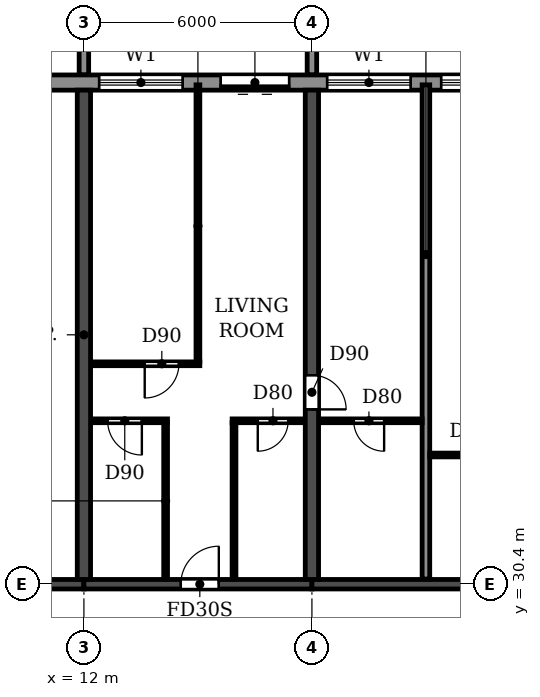
"""IFC4 building model, lengths in metres.
Left out: names, types, materials, properties, quantities, classifications, styles, units other than length and angle.
Written with IfcOpenShell. Run it as: python <this file> out.ifc"""

import sys

from ifc_helpers import new_model, si_unit, direction, frame, frame_2d, origin, place, context, subcontext, project, spatial, polyline, rectangle, outline, extrude, source, transform, mapped, element, fill, save


model = new_model("IFC4")
c1 = context("Model", 3, precision=1e-05, world=origin(), true_north=direction((0.0, 1.0)))
c2 = subcontext(c1, "Body", "Model", "MODEL_VIEW")
j1 = project(units=[si_unit("LENGTHUNIT", "METRE"), si_unit("PLANEANGLEUNIT", "RADIAN")], contexts=[c1])
p1 = place(None, origin())
s1 = spatial("IfcSite", under=j1, at=p1, CompositionType="ELEMENT")
p2 = place(p1, origin())
s2 = spatial("IfcBuilding", under=s1, at=p2, CompositionType="ELEMENT")
p3 = place(p2, frame((0.0, 0.0, 92.7)))
s3 = spatial("IfcBuildingStorey", under=s2, at=p3, CompositionType="ELEMENT", Elevation=92.7)
p4 = place(p3, frame((12.0, 30.525, 0.0), z_axis=(0.0, 0.0, 1.0), x_axis=(0.0, 1.0, 0.0)))
e1 = element("IfcWall", 1, at=p4, inside=s3, PredefinedType="SHEAR", context=c2, shape_type="SweptSolid", body=[
    extrude(rectangle(XDim=12.875, YDim=0.35, at=frame_2d((6.438, 0.0))), origin(), (0.0, 0.0, 1.0), 3.06),
])
p5 = place(p3, frame((18.0, 30.525, 0.0), z_axis=(0.0, 0.0, 1.0), x_axis=(0.0, 1.0, 0.0)))
e2 = element("IfcWall", 2, at=p5, inside=s3, PredefinedType="SHEAR", context=c2, shape_type="SweptSolid", body=[
    extrude(rectangle(XDim=12.875, YDim=0.35, at=frame_2d((6.438, 0.0))), origin(), (0.0, 0.0, 1.0), 3.06),
])
p6 = place(p5, frame((4.475, 0.0, 0.0)))
e3 = element("IfcOpeningElement", 3, at=p6, cuts=e2, PredefinedType="OPENING", context=c2, shape_type="SweptSolid", body=[
    extrude(rectangle(XDim=0.9, YDim=2.1, at=frame_2d((0.45, 1.05))), frame((0.0, 0.185, 0.0), z_axis=(0.0, -1.0, 0.0), x_axis=(1.0, 0.0, 0.0)), (0.0, 0.0, 1.0), 0.37),
])
p7 = place(p3, frame((6.2, 30.4, 0.0), z_axis=(0.0, 0.0, 1.0), x_axis=(1.0, 0.0, 0.0)))
e4 = element("IfcWall", 4, at=p7, inside=s3, PredefinedType="SHEAR", context=c2, shape_type="SweptSolid", body=[
    extrude(rectangle(XDim=5.8, YDim=0.25, at=frame_2d((2.9, 0.0))), origin(), (0.0, 0.0, 1.0), 2.46),
])
p8 = place(p7, frame((2.3, 0.0, 0.0)))
e5 = element("IfcOpeningElement", 5, at=p8, cuts=e4, PredefinedType="OPENING", context=c2, shape_type="SweptSolid", body=[
    extrude(rectangle(XDim=1.0, YDim=2.1, at=frame_2d((0.5, 1.05))), frame((0.0, 0.135, 0.0), z_axis=(0.0, -1.0, 0.0), x_axis=(1.0, 0.0, 0.0)), (0.0, 0.0, 1.0), 0.27),
])
p9 = place(p3, frame((12.0, 30.4, 0.0), z_axis=(0.0, 0.0, 1.0), x_axis=(1.0, 0.0, 0.0)))
e6 = element("IfcWall", 6, at=p9, inside=s3, PredefinedType="SHEAR", context=c2, shape_type="SweptSolid", body=[
    extrude(rectangle(XDim=6.0, YDim=0.25, at=frame_2d((3.0, 0.0))), origin(), (0.0, 0.0, 1.0), 2.46),
])
p10 = place(p9, frame((2.55, 0.0, 0.0)))
e7 = element("IfcOpeningElement", 7, at=p10, cuts=e6, PredefinedType="OPENING", context=c2, shape_type="SweptSolid", body=[
    extrude(rectangle(XDim=1.0, YDim=2.1, at=frame_2d((0.5, 1.05))), frame((0.0, 0.135, 0.0), z_axis=(0.0, -1.0, 0.0), x_axis=(1.0, 0.0, 0.0)), (0.0, 0.0, 1.0), 0.27),
])
p11 = place(p3, frame((18.0, 30.4, 0.0), z_axis=(0.0, 0.0, 1.0), x_axis=(1.0, 0.0, 0.0)))
e8 = element("IfcWall", 8, at=p11, inside=s3, PredefinedType="SHEAR", context=c2, shape_type="SweptSolid", body=[
    extrude(rectangle(XDim=6.0, YDim=0.25, at=frame_2d((3.0, 0.0))), origin(), (0.0, 0.0, 1.0), 2.46),
])
p12 = place(p3, frame((91.317, 43.6, 0.0), z_axis=(0.0, 0.0, 1.0), x_axis=(-1.0, 0.0, 0.0)))
e9 = element("IfcWall", 9, at=p12, inside=s3, PredefinedType="STANDARD", context=c2, shape_type="SweptSolid", body=[
    extrude(rectangle(XDim=80.634, YDim=0.4, at=frame_2d((40.317, 0.0))), origin(), (0.0, 0.0, 1.0), 3.06),
])
p13 = place(p12, frame((76.717, 0.0, 0.9)))
e10 = element("IfcOpeningElement", 10, at=p13, cuts=e9, PredefinedType="OPENING", context=c2, shape_type="SweptSolid", body=[
    extrude(rectangle(XDim=2.2, YDim=1.5, at=frame_2d((1.1, 0.75))), frame((0.0, 0.21, 0.0), z_axis=(0.0, -1.0, 0.0), x_axis=(1.0, 0.0, 0.0)), (0.0, 0.0, 1.0), 0.42),
])
p14 = place(p12, frame((73.917, 0.0, 0.0)))
e11 = element("IfcOpeningElement", 11, at=p14, cuts=e9, PredefinedType="OPENING", context=c2, shape_type="SweptSolid", body=[
    extrude(rectangle(XDim=1.8, YDim=2.4, at=frame_2d((0.9, 1.2))), frame((0.0, 0.21, 0.0), z_axis=(0.0, -1.0, 0.0), x_axis=(1.0, 0.0, 0.0)), (0.0, 0.0, 1.0), 0.42),
])
p15 = place(p12, frame((70.717, 0.0, 0.9)))
e12 = element("IfcOpeningElement", 12, at=p15, cuts=e9, PredefinedType="OPENING", context=c2, shape_type="SweptSolid", body=[
    extrude(rectangle(XDim=2.2, YDim=1.5, at=frame_2d((1.1, 0.75))), frame((0.0, 0.21, 0.0), z_axis=(0.0, -1.0, 0.0), x_axis=(1.0, 0.0, 0.0)), (0.0, 0.0, 1.0), 0.42),
])
p16 = place(p12, frame((67.717, 0.0, 0.9)))
e13 = element("IfcOpeningElement", 13, at=p16, cuts=e9, PredefinedType="OPENING", context=c2, shape_type="SweptSolid", body=[
    extrude(rectangle(XDim=2.2, YDim=1.5, at=frame_2d((1.1, 0.75))), frame((0.0, 0.21, 0.0), z_axis=(0.0, -1.0, 0.0), x_axis=(1.0, 0.0, 0.0)), (0.0, 0.0, 1.0), 0.42),
])
p17 = place(p12, frame((64.717, 0.0, 0.9)))
e14 = element("IfcOpeningElement", 14, at=p17, cuts=e9, PredefinedType="OPENING", context=c2, shape_type="SweptSolid", body=[
    extrude(rectangle(XDim=2.2, YDim=1.5, at=frame_2d((1.1, 0.75))), frame((0.0, 0.21, 0.0), z_axis=(0.0, -1.0, 0.0), x_axis=(1.0, 0.0, 0.0)), (0.0, 0.0, 1.0), 0.42),
])
p18 = place(p12, frame((61.917, 0.0, 0.0)))
e15 = element("IfcOpeningElement", 15, at=p18, cuts=e9, PredefinedType="OPENING", context=c2, shape_type="SweptSolid", body=[
    extrude(rectangle(XDim=1.8, YDim=2.4, at=frame_2d((0.9, 1.2))), frame((0.0, 0.21, 0.0), z_axis=(0.0, -1.0, 0.0), x_axis=(1.0, 0.0, 0.0)), (0.0, 0.0, 1.0), 0.42),
])
p19 = place(p12, frame((58.717, 0.0, 0.9)))
e16 = element("IfcOpeningElement", 16, at=p19, cuts=e9, PredefinedType="OPENING", context=c2, shape_type="SweptSolid", body=[
    extrude(rectangle(XDim=2.2, YDim=1.5, at=frame_2d((1.1, 0.75))), frame((0.0, 0.21, 0.0), z_axis=(0.0, -1.0, 0.0), x_axis=(1.0, 0.0, 0.0)), (0.0, 0.0, 1.0), 0.42),
])
p20 = place(p12, frame((55.717, 0.0, 0.9)))
e17 = element("IfcOpeningElement", 17, at=p20, cuts=e9, PredefinedType="OPENING", context=c2, shape_type="SweptSolid", body=[
    extrude(rectangle(XDim=2.2, YDim=1.5, at=frame_2d((1.1, 0.75))), frame((0.0, 0.21, 0.0), z_axis=(0.0, -1.0, 0.0), x_axis=(1.0, 0.0, 0.0)), (0.0, 0.0, 1.0), 0.42),
])
p21 = place(p12, frame((52.917, 0.0, 0.0)))
e18 = element("IfcOpeningElement", 18, at=p21, cuts=e9, PredefinedType="OPENING", context=c2, shape_type="SweptSolid", body=[
    extrude(rectangle(XDim=1.8, YDim=2.4, at=frame_2d((0.9, 1.2))), frame((0.0, 0.21, 0.0), z_axis=(0.0, -1.0, 0.0), x_axis=(1.0, 0.0, 0.0)), (0.0, 0.0, 1.0), 0.42),
])
p22 = place(p12, frame((49.717, 0.0, 0.9)))
e19 = element("IfcOpeningElement", 19, at=p22, cuts=e9, PredefinedType="OPENING", context=c2, shape_type="SweptSolid", body=[
    extrude(rectangle(XDim=2.2, YDim=1.5, at=frame_2d((1.1, 0.75))), frame((0.0, 0.21, 0.0), z_axis=(0.0, -1.0, 0.0), x_axis=(1.0, 0.0, 0.0)), (0.0, 0.0, 1.0), 0.42),
])
p23 = place(p12, frame((46.717, 0.0, 0.9)))
e20 = element("IfcOpeningElement", 20, at=p23, cuts=e9, PredefinedType="OPENING", context=c2, shape_type="SweptSolid", body=[
    extrude(rectangle(XDim=2.2, YDim=1.5, at=frame_2d((1.1, 0.75))), frame((0.0, 0.21, 0.0), z_axis=(0.0, -1.0, 0.0), x_axis=(1.0, 0.0, 0.0)), (0.0, 0.0, 1.0), 0.42),
])
p24 = place(p12, frame((43.717, 0.0, 0.9)))
e21 = element("IfcOpeningElement", 21, at=p24, cuts=e9, PredefinedType="OPENING", context=c2, shape_type="SweptSolid", body=[
    extrude(rectangle(XDim=2.2, YDim=1.5, at=frame_2d((1.1, 0.75))), frame((0.0, 0.21, 0.0), z_axis=(0.0, -1.0, 0.0), x_axis=(1.0, 0.0, 0.0)), (0.0, 0.0, 1.0), 0.42),
])
p25 = place(p12, frame((40.717, 0.0, 0.9)))
e22 = element("IfcOpeningElement", 22, at=p25, cuts=e9, PredefinedType="OPENING", context=c2, shape_type="SweptSolid", body=[
    extrude(rectangle(XDim=2.2, YDim=1.5, at=frame_2d((1.1, 0.75))), frame((0.0, 0.21, 0.0), z_axis=(0.0, -1.0, 0.0), x_axis=(1.0, 0.0, 0.0)), (0.0, 0.0, 1.0), 0.42),
])
p26 = place(p12, frame((37.917, 0.0, 0.0)))
e23 = element("IfcOpeningElement", 23, at=p26, cuts=e9, PredefinedType="OPENING", context=c2, shape_type="SweptSolid", body=[
    extrude(rectangle(XDim=1.8, YDim=2.4, at=frame_2d((0.9, 1.2))), frame((0.0, 0.21, 0.0), z_axis=(0.0, -1.0, 0.0), x_axis=(1.0, 0.0, 0.0)), (0.0, 0.0, 1.0), 0.42),
])
p27 = place(p12, frame((34.917, 0.0, 0.0)))
e24 = element("IfcOpeningElement", 24, at=p27, cuts=e9, PredefinedType="OPENING", context=c2, shape_type="SweptSolid", body=[
    extrude(rectangle(XDim=1.8, YDim=2.4, at=frame_2d((0.9, 1.2))), frame((0.0, 0.21, 0.0), z_axis=(0.0, -1.0, 0.0), x_axis=(1.0, 0.0, 0.0)), (0.0, 0.0, 1.0), 0.42),
])
p28 = place(p12, frame((31.717, 0.0, 0.9)))
e25 = element("IfcOpeningElement", 25, at=p28, cuts=e9, PredefinedType="OPENING", context=c2, shape_type="SweptSolid", body=[
    extrude(rectangle(XDim=2.2, YDim=1.5, at=frame_2d((1.1, 0.75))), frame((0.0, 0.21, 0.0), z_axis=(0.0, -1.0, 0.0), x_axis=(1.0, 0.0, 0.0)), (0.0, 0.0, 1.0), 0.42),
])
p29 = place(p12, frame((28.717, 0.0, 0.9)))
e26 = element("IfcOpeningElement", 26, at=p29, cuts=e9, PredefinedType="OPENING", context=c2, shape_type="SweptSolid", body=[
    extrude(rectangle(XDim=2.2, YDim=1.5, at=frame_2d((1.1, 0.75))), frame((0.0, 0.21, 0.0), z_axis=(0.0, -1.0, 0.0), x_axis=(1.0, 0.0, 0.0)), (0.0, 0.0, 1.0), 0.42),
])
p30 = place(p12, frame((25.717, 0.0, 0.9)))
e27 = element("IfcOpeningElement", 27, at=p30, cuts=e9, PredefinedType="OPENING", context=c2, shape_type="SweptSolid", body=[
    extrude(rectangle(XDim=2.2, YDim=1.5, at=frame_2d((1.1, 0.75))), frame((0.0, 0.21, 0.0), z_axis=(0.0, -1.0, 0.0), x_axis=(1.0, 0.0, 0.0)), (0.0, 0.0, 1.0), 0.42),
])
p31 = place(p12, frame((22.717, 0.0, 0.9)))
e28 = element("IfcOpeningElement", 28, at=p31, cuts=e9, PredefinedType="OPENING", context=c2, shape_type="SweptSolid", body=[
    extrude(rectangle(XDim=2.2, YDim=1.5, at=frame_2d((1.1, 0.75))), frame((0.0, 0.21, 0.0), z_axis=(0.0, -1.0, 0.0), x_axis=(1.0, 0.0, 0.0)), (0.0, 0.0, 1.0), 0.42),
])
p32 = place(p12, frame((19.917, 0.0, 0.0)))
e29 = element("IfcOpeningElement", 29, at=p32, cuts=e9, PredefinedType="OPENING", context=c2, shape_type="SweptSolid", body=[
    extrude(rectangle(XDim=1.8, YDim=2.4, at=frame_2d((0.9, 1.2))), frame((0.0, 0.21, 0.0), z_axis=(0.0, -1.0, 0.0), x_axis=(1.0, 0.0, 0.0)), (0.0, 0.0, 1.0), 0.42),
])
p33 = place(p12, frame((16.717, 0.0, 0.9)))
e30 = element("IfcOpeningElement", 30, at=p33, cuts=e9, PredefinedType="OPENING", context=c2, shape_type="SweptSolid", body=[
    extrude(rectangle(XDim=2.2, YDim=1.5, at=frame_2d((1.1, 0.75))), frame((0.0, 0.21, 0.0), z_axis=(0.0, -1.0, 0.0), x_axis=(1.0, 0.0, 0.0)), (0.0, 0.0, 1.0), 0.42),
])
p34 = place(p12, frame((13.917, 0.0, 0.0)))
e31 = element("IfcOpeningElement", 31, at=p34, cuts=e9, PredefinedType="OPENING", context=c2, shape_type="SweptSolid", body=[
    extrude(rectangle(XDim=1.8, YDim=2.4, at=frame_2d((0.9, 1.2))), frame((0.0, 0.21, 0.0), z_axis=(0.0, -1.0, 0.0), x_axis=(1.0, 0.0, 0.0)), (0.0, 0.0, 1.0), 0.42),
])
p35 = place(p12, frame((10.717, 0.0, 0.9)))
e32 = element("IfcOpeningElement", 32, at=p35, cuts=e9, PredefinedType="OPENING", context=c2, shape_type="SweptSolid", body=[
    extrude(rectangle(XDim=2.2, YDim=1.5, at=frame_2d((1.1, 0.75))), frame((0.0, 0.21, 0.0), z_axis=(0.0, -1.0, 0.0), x_axis=(1.0, 0.0, 0.0)), (0.0, 0.0, 1.0), 0.42),
])
p36 = place(p12, frame((7.917, 0.0, 0.0)))
e33 = element("IfcOpeningElement", 33, at=p36, cuts=e9, PredefinedType="OPENING", context=c2, shape_type="SweptSolid", body=[
    extrude(rectangle(XDim=1.8, YDim=2.4, at=frame_2d((0.9, 1.2))), frame((0.0, 0.21, 0.0), z_axis=(0.0, -1.0, 0.0), x_axis=(1.0, 0.0, 0.0)), (0.0, 0.0, 1.0), 0.42),
])
p37 = place(p12, frame((4.717, 0.0, 0.9)))
e34 = element("IfcOpeningElement", 34, at=p37, cuts=e9, PredefinedType="OPENING", context=c2, shape_type="SweptSolid", body=[
    extrude(rectangle(XDim=2.2, YDim=1.5, at=frame_2d((1.1, 0.75))), frame((0.0, 0.21, 0.0), z_axis=(0.0, -1.0, 0.0), x_axis=(1.0, 0.0, 0.0)), (0.0, 0.0, 1.0), 0.42),
])
p38 = place(p12, frame((1.917, 0.0, 0.0)))
e35 = element("IfcOpeningElement", 35, at=p38, cuts=e9, PredefinedType="OPENING", context=c2, shape_type="SweptSolid", body=[
    extrude(rectangle(XDim=1.8, YDim=2.4, at=frame_2d((0.9, 1.2))), frame((0.0, 0.21, 0.0), z_axis=(0.0, -1.0, 0.0), x_axis=(1.0, 0.0, 0.0)), (0.0, 0.0, 1.0), 0.42),
])
m1 = source(origin(), c2, "Body", "SweptSolid", [
    extrude(outline(polyline([(0.0, 0.0), (0.25, 0.0), (0.25, 3.1), (0.0, 3.1), (0.0, 0.0)])), origin(), (0.0, 0.0, 1.0), 3.1),
])
for number, where in (
    (36, (11.875, 43.8, 0.0)),
    (37, (17.875, 43.8, 0.0)),
):
    element("IfcWall", number, at=place(p3, frame(where)), inside=s3, PredefinedType="STANDARD", context=c2, shape_type="MappedRepresentation", body=[
        mapped(m1, transform((0.0, 0.0, 0.0))),
    ])
p39 = place(p3, frame((21.0, 30.535, 0.0), z_axis=(0.0, 0.0, 1.0), x_axis=(0.0, 1.0, 0.0)))
e38 = element("IfcWall", 38, at=p39, inside=s3, PredefinedType="PARTITIONING", context=c2, shape_type="SweptSolid", body=[
    extrude(rectangle(XDim=13.005, YDim=0.2, at=frame_2d((6.502, 0.0))), origin(), (0.0, 0.0, 1.0), 3.06),
])
p40 = place(p3, frame((21.1, 33.8, 0.0), z_axis=(0.0, 0.0, 1.0), x_axis=(1.0, 0.0, 0.0)))
e39 = element("IfcWall", 39, at=p40, inside=s3, PredefinedType="PARTITIONING", context=c2, shape_type="SweptSolid", body=[
    extrude(rectangle(XDim=2.715, YDim=0.1, at=frame_2d((1.357, 0.0))), origin(), (0.0, 0.0, 1.0), 3.06),
])
p41 = place(p40, frame((1.0, 0.0, 0.0)))
e40 = element("IfcOpeningElement", 40, at=p41, cuts=e39, PredefinedType="OPENING", context=c2, shape_type="SweptSolid", body=[
    extrude(rectangle(XDim=0.8, YDim=2.1, at=frame_2d((0.4, 1.05))), frame((0.0, 0.06, 0.0), z_axis=(0.0, -1.0, 0.0), x_axis=(1.0, 0.0, 0.0)), (0.0, 0.0, 1.0), 0.12),
])
p42 = place(p3, frame((12.185, 34.7, 0.0), z_axis=(0.0, 0.0, 1.0), x_axis=(1.0, 0.0, 0.0)))
e41 = element("IfcWall", 41, at=p42, inside=s3, PredefinedType="PARTITIONING", context=c2, shape_type="SweptSolid", body=[
    extrude(rectangle(XDim=2.015, YDim=0.1, at=frame_2d((1.007, 0.0))), origin(), (0.0, 0.0, 1.0), 3.06),
])
p43 = place(p42, frame((0.44, 0.0, 0.0)))
e42 = element("IfcOpeningElement", 42, at=p43, cuts=e41, PredefinedType="OPENING", context=c2, shape_type="SweptSolid", body=[
    extrude(rectangle(XDim=0.9, YDim=2.1, at=frame_2d((0.45, 1.05))), frame((0.0, 0.06, 0.0), z_axis=(0.0, -1.0, 0.0), x_axis=(1.0, 0.0, 0.0)), (0.0, 0.0, 1.0), 0.12),
])
p44 = place(p3, frame((15.9, 34.7, 0.0), z_axis=(0.0, 0.0, 1.0), x_axis=(1.0, 0.0, 0.0)))
e43 = element("IfcWall", 43, at=p44, inside=s3, PredefinedType="PARTITIONING", context=c2, shape_type="SweptSolid", body=[
    extrude(rectangle(XDim=1.915, YDim=0.1, at=frame_2d((0.958, 0.0))), origin(), (0.0, 0.0, 1.0), 3.06),
])
p45 = place(p44, frame((0.675, 0.0, 0.0)))
e44 = element("IfcOpeningElement", 44, at=p45, cuts=e43, PredefinedType="OPENING", context=c2, shape_type="SweptSolid", body=[
    extrude(rectangle(XDim=0.8, YDim=2.1, at=frame_2d((0.4, 1.05))), frame((0.0, 0.06, 0.0), z_axis=(0.0, -1.0, 0.0), x_axis=(1.0, 0.0, 0.0)), (0.0, 0.0, 1.0), 0.12),
])
p46 = place(p3, frame((18.185, 34.7, 0.0), z_axis=(0.0, 0.0, 1.0), x_axis=(1.0, 0.0, 0.0)))
e45 = element("IfcWall", 45, at=p46, inside=s3, PredefinedType="PARTITIONING", context=c2, shape_type="SweptSolid", body=[
    extrude(rectangle(XDim=2.715, YDim=0.1, at=frame_2d((1.357, 0.0))), origin(), (0.0, 0.0, 1.0), 3.06),
])
p47 = place(p46, frame((0.915, 0.0, 0.0)))
e46 = element("IfcOpeningElement", 46, at=p47, cuts=e45, PredefinedType="OPENING", context=c2, shape_type="SweptSolid", body=[
    extrude(rectangle(XDim=0.8, YDim=2.1, at=frame_2d((0.4, 1.05))), frame((0.0, 0.06, 0.0), z_axis=(0.0, -1.0, 0.0), x_axis=(1.0, 0.0, 0.0)), (0.0, 0.0, 1.0), 0.12),
])
p48 = place(p3, frame((12.185, 36.2, 0.0), z_axis=(0.0, 0.0, 1.0), x_axis=(1.0, 0.0, 0.0)))
e47 = element("IfcWall", 47, at=p48, inside=s3, PredefinedType="PARTITIONING", context=c2, shape_type="SweptSolid", body=[
    extrude(rectangle(XDim=2.865, YDim=0.1, at=frame_2d((1.433, 0.0))), origin(), (0.0, 0.0, 1.0), 3.06),
])
p49 = place(p48, frame((1.415, 0.0, 0.0)))
e48 = element("IfcOpeningElement", 48, at=p49, cuts=e47, PredefinedType="OPENING", context=c2, shape_type="SweptSolid", body=[
    extrude(rectangle(XDim=0.9, YDim=2.1, at=frame_2d((0.45, 1.05))), frame((0.0, 0.06, 0.0), z_axis=(0.0, -1.0, 0.0), x_axis=(1.0, 0.0, 0.0)), (0.0, 0.0, 1.0), 0.12),
])
p50 = place(p3, frame((14.15, 30.535, 0.0), z_axis=(0.0, 0.0, 1.0), x_axis=(0.0, 1.0, 0.0)))
e49 = element("IfcWall", 49, at=p50, inside=s3, PredefinedType="PARTITIONING", context=c2, shape_type="SweptSolid", body=[
    extrude(rectangle(XDim=4.115, YDim=0.1, at=frame_2d((2.058, 0.0))), origin(), (0.0, 0.0, 1.0), 3.06),
])
p51 = place(p3, frame((15.0, 36.25, 0.0), z_axis=(0.0, 0.0, 1.0), x_axis=(0.0, 1.0, 0.0)))
e50 = element("IfcWall", 50, at=p51, inside=s3, PredefinedType="PARTITIONING", context=c2, shape_type="SweptSolid", body=[
    extrude(rectangle(XDim=7.29, YDim=0.1, at=frame_2d((3.645, 0.0))), origin(), (0.0, 0.0, 1.0), 3.06),
])
p52 = place(p3, frame((15.95, 30.535, 0.0), z_axis=(0.0, 0.0, 1.0), x_axis=(0.0, 1.0, 0.0)))
e51 = element("IfcWall", 51, at=p52, inside=s3, PredefinedType="PARTITIONING", context=c2, shape_type="SweptSolid", body=[
    extrude(rectangle(XDim=4.115, YDim=0.1, at=frame_2d((2.058, 0.0))), origin(), (0.0, 0.0, 1.0), 3.06),
])
p53 = place(p13, origin())
e52 = element("IfcWindow", 52, at=p53, inside=s3, PartitioningType="DOUBLE_PANEL_HORIZONTAL", PredefinedType="WINDOW", context=c2, shape_type="SweptSolid", body=[
    extrude(rectangle(XDim=2.2, YDim=1.5, at=frame_2d((1.1, 0.75))), frame((0.0, 0.03, 0.0), z_axis=(0.0, -1.0, 0.0), x_axis=(1.0, 0.0, 0.0)), (0.0, 0.0, 1.0), 0.06),
])
fill(e10, e52)
p54 = place(p14, origin())
e53 = element("IfcDoor", 53, at=p54, inside=s3, OperationType="DOUBLE_DOOR_SLIDING", PredefinedType="DOOR", context=c2, shape_type="SweptSolid", body=[
    extrude(rectangle(XDim=1.8, YDim=2.4, at=frame_2d((0.9, 1.2))), frame((0.0, 0.025, 0.0), z_axis=(0.0, -1.0, 0.0), x_axis=(1.0, 0.0, 0.0)), (0.0, 0.0, 1.0), 0.05),
])
fill(e11, e53)
p55 = place(p15, origin())
e54 = element("IfcWindow", 54, at=p55, inside=s3, PartitioningType="DOUBLE_PANEL_HORIZONTAL", PredefinedType="WINDOW", context=c2, shape_type="SweptSolid", body=[
    extrude(rectangle(XDim=2.2, YDim=1.5, at=frame_2d((1.1, 0.75))), frame((0.0, 0.03, 0.0), z_axis=(0.0, -1.0, 0.0), x_axis=(1.0, 0.0, 0.0)), (0.0, 0.0, 1.0), 0.06),
])
fill(e12, e54)
p56 = place(p16, origin())
e55 = element("IfcWindow", 55, at=p56, inside=s3, PartitioningType="DOUBLE_PANEL_HORIZONTAL", PredefinedType="WINDOW", context=c2, shape_type="SweptSolid", body=[
    extrude(rectangle(XDim=2.2, YDim=1.5, at=frame_2d((1.1, 0.75))), frame((0.0, 0.03, 0.0), z_axis=(0.0, -1.0, 0.0), x_axis=(1.0, 0.0, 0.0)), (0.0, 0.0, 1.0), 0.06),
])
fill(e13, e55)
p57 = place(p47, frame((0.8, 0.0, 0.0), z_axis=(0.0, 0.0, 1.0), x_axis=(-1.0, 0.0, 0.0)))
e56 = element("IfcDoor", 56, at=p57, inside=s3, OperationType="SINGLE_SWING_LEFT", PredefinedType="DOOR", context=c2, shape_type="SweptSolid", body=[
    extrude(rectangle(XDim=0.8, YDim=2.1, at=frame_2d((0.4, 1.05))), frame((0.0, 0.025, 0.0), z_axis=(0.0, -1.0, 0.0), x_axis=(1.0, 0.0, 0.0)), (0.0, 0.0, 1.0), 0.05),
])
fill(e46, e56)
p58 = place(p43, frame((0.9, 0.0, 0.0), z_axis=(0.0, 0.0, 1.0), x_axis=(-1.0, 0.0, 0.0)))
e57 = element("IfcDoor", 57, at=p58, inside=s3, OperationType="SINGLE_SWING_LEFT", PredefinedType="DOOR", context=c2, shape_type="SweptSolid", body=[
    extrude(rectangle(XDim=0.9, YDim=2.1, at=frame_2d((0.45, 1.05))), frame((0.0, 0.025, 0.0), z_axis=(0.0, -1.0, 0.0), x_axis=(1.0, 0.0, 0.0)), (0.0, 0.0, 1.0), 0.05),
])
fill(e42, e57)
p59 = place(p49, frame((0.9, 0.0, 0.0), z_axis=(0.0, 0.0, 1.0), x_axis=(-1.0, 0.0, 0.0)))
e58 = element("IfcDoor", 58, at=p59, inside=s3, OperationType="SINGLE_SWING_RIGHT", PredefinedType="DOOR", context=c2, shape_type="SweptSolid", body=[
    extrude(rectangle(XDim=0.9, YDim=2.1, at=frame_2d((0.45, 1.05))), frame((0.0, 0.025, 0.0), z_axis=(0.0, -1.0, 0.0), x_axis=(1.0, 0.0, 0.0)), (0.0, 0.0, 1.0), 0.05),
])
fill(e48, e58)
p60 = place(p10, origin())
e59 = element("IfcDoor", 59, at=p60, inside=s3, OperationType="SINGLE_SWING_RIGHT", PredefinedType="DOOR", context=c2, shape_type="SweptSolid", body=[
    extrude(rectangle(XDim=1.0, YDim=2.1, at=frame_2d((0.5, 1.05))), frame((0.0, 0.025, 0.0), z_axis=(0.0, -1.0, 0.0), x_axis=(1.0, 0.0, 0.0)), (0.0, 0.0, 1.0), 0.05),
])
fill(e7, e59)
p61 = place(p45, frame((0.8, 0.0, 0.0), z_axis=(0.0, 0.0, 1.0), x_axis=(-1.0, 0.0, 0.0)))
e60 = element("IfcDoor", 60, at=p61, inside=s3, OperationType="SINGLE_SWING_RIGHT", PredefinedType="DOOR", context=c2, shape_type="SweptSolid", body=[
    extrude(rectangle(XDim=0.8, YDim=2.1, at=frame_2d((0.4, 1.05))), frame((0.0, 0.025, 0.0), z_axis=(0.0, -1.0, 0.0), x_axis=(1.0, 0.0, 0.0)), (0.0, 0.0, 1.0), 0.05),
])
fill(e44, e60)
p62 = place(p6, frame((0.9, 0.0, 0.0), z_axis=(0.0, 0.0, 1.0), x_axis=(-1.0, 0.0, 0.0)))
e61 = element("IfcDoor", 61, at=p62, inside=s3, OperationType="SINGLE_SWING_RIGHT", PredefinedType="DOOR", context=c2, shape_type="SweptSolid", body=[
    extrude(rectangle(XDim=0.9, YDim=2.1, at=frame_2d((0.45, 1.05))), frame((0.0, 0.025, 0.0), z_axis=(0.0, -1.0, 0.0), x_axis=(1.0, 0.0, 0.0)), (0.0, 0.0, 1.0), 0.05),
])
fill(e3, e61)
save(model, sys.argv[1])
